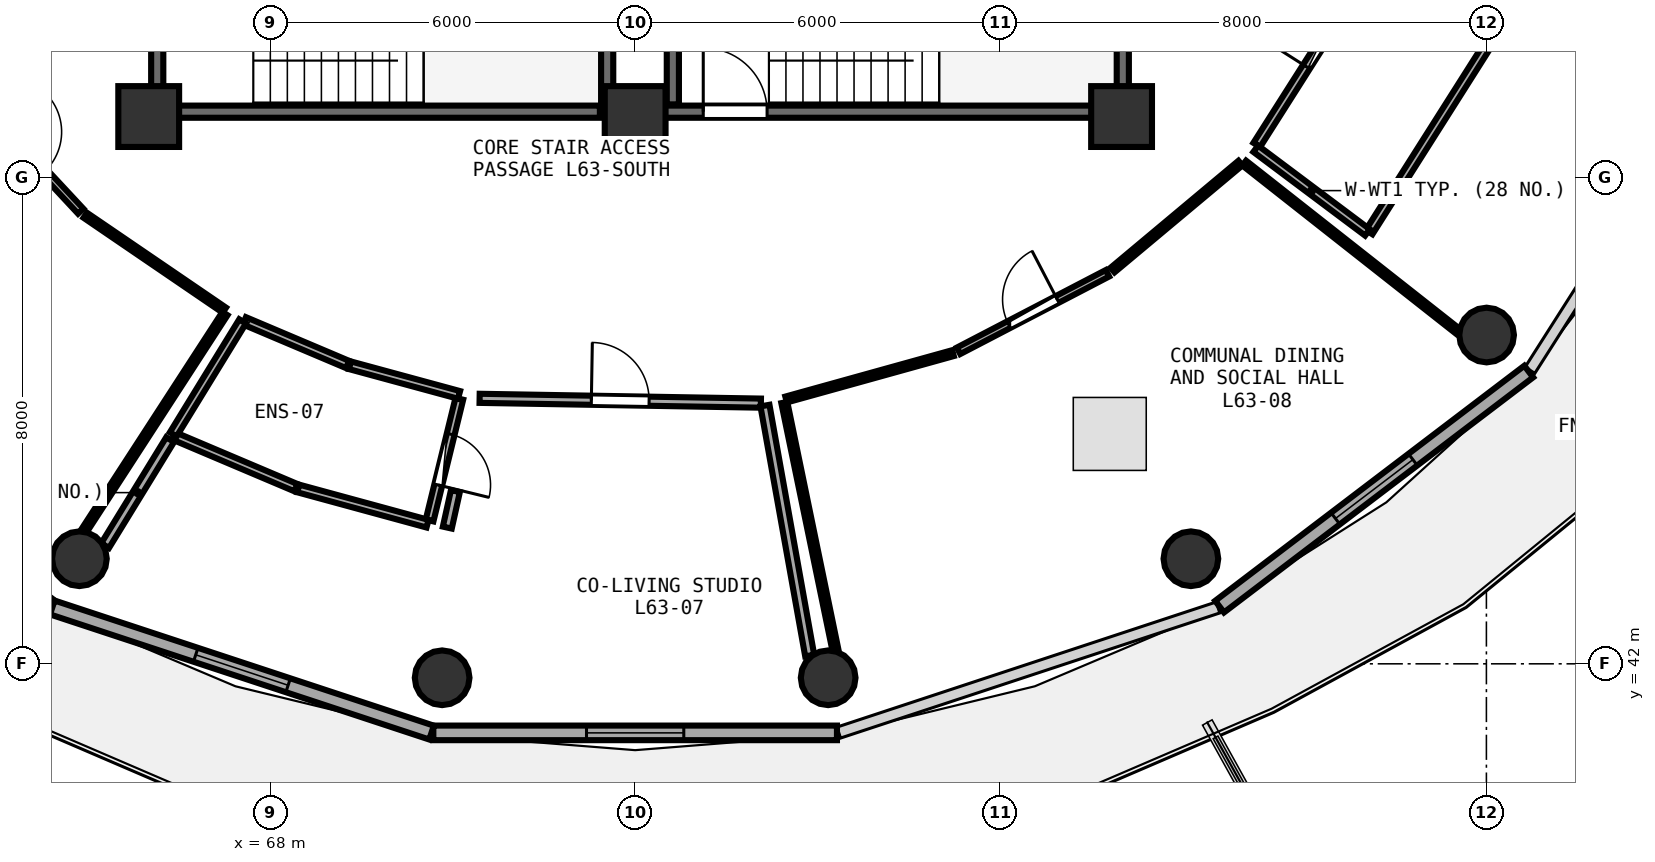
"""IFC4 building model, lengths in metres.
Left out: names, types, materials, properties, quantities, classifications, styles, units other than length and angle.
Written with IfcOpenShell. Run it as: python <this file> out.ifc"""

import sys

from ifc_helpers import new_model, si_unit, direction, frame, frame_2d, origin, origin_2d, place, context, subcontext, project, spatial, rectangle, circle, extrude, element, fill, save


model = new_model("IFC4")
c1 = context("Model", 3, precision=1e-05, world=origin(), true_north=direction((0.0, 1.0)))
c2 = subcontext(c1, "Body", "Model", "MODEL_VIEW")
j1 = project(units=[si_unit("LENGTHUNIT", "METRE"), si_unit("PLANEANGLEUNIT", "RADIAN")], contexts=[c1])
p1 = place(None, origin())
s1 = spatial("IfcSite", under=j1, at=p1, CompositionType="ELEMENT")
p2 = place(p1, origin())
s2 = spatial("IfcBuilding", under=s1, at=p2, CompositionType="ELEMENT")
p3 = place(p2, frame((0.0, 0.0, 248.7)))
s3 = spatial("IfcBuildingStorey", under=s2, at=p3, CompositionType="ELEMENT", Elevation=248.7)
for number, where, z_axis, x_axis in (
    (1, (66.0, 51.0, 0.0), (0.0, 0.0, 1.0), (1.0, 0.0, 0.0)),
    (2, (74.0, 51.0, 0.0), (0.0, 0.0, 1.0), (1.0, 0.0, 0.0)),
    (3, (82.0, 51.0, 0.0), (0.0, 0.0, 1.0), (1.0, 0.0, 0.0)),
):
    element("IfcColumn", number, at=place(p3, frame(where, z_axis=z_axis, x_axis=x_axis)), inside=s3, PredefinedType="PILASTER", context=c2, shape_type="SweptSolid", body=[
        extrude(rectangle(XDim=1.0, YDim=1.0, at=origin_2d()), origin(), (0.0, 0.0, 1.0), 3.75),
    ])
for number, where, z_axis, x_axis in (
    (4, (64.86, 43.728, 0.0), (0.0, 0.0, 1.0), (1.0, 0.0, 0.0)),
    (5, (70.826, 41.771, 0.0), (0.0, 0.0, 1.0), (1.0, 0.0, 0.0)),
    (6, (77.174, 41.771, 0.0), (0.0, 0.0, 1.0), (1.0, 0.0, 0.0)),
    (7, (83.14, 43.728, 0.0), (0.0, 0.0, 1.0), (1.0, 0.0, 0.0)),
    (8, (88.003, 47.407, 0.0), (0.0, 0.0, 1.0), (1.0, 0.0, 0.0)),
):
    element("IfcColumn", number, at=place(p3, frame(where, z_axis=z_axis, x_axis=x_axis)), inside=s3, PredefinedType="COLUMN", context=c2, shape_type="SweptSolid", body=[
        extrude(circle(Radius=0.45, at=origin_2d()), origin(), (0.0, 0.0, 1.0), 3.75),
    ])
p4 = place(p3, frame((59.304, 46.806, 0.0), z_axis=(0.0, 0.0, 1.0), x_axis=(0.796010444211, -0.605282886514, 0.0)))
e9 = element("IfcWall", 9, at=p4, inside=s3, PredefinedType="SOLIDWALL", context=c2, shape_type="SweptSolid", body=[
    extrude(rectangle(XDim=6.387, YDim=0.24, at=frame_2d((3.194, 0.0))), origin(), (0.0, 0.0, 1.0), 3.475),
])
p5 = place(p4, frame((2.394, 0.0, 0.85)))
e10 = element("IfcOpeningElement", 10, at=p5, cuts=e9, PredefinedType="OPENING", context=c2, shape_type="SweptSolid", body=[
    extrude(rectangle(XDim=1.6, YDim=1.45, at=frame_2d((0.8, 0.725))), frame((0.0, 0.13, 0.0), z_axis=(0.0, -1.0, 0.0), x_axis=(1.0, 0.0, 0.0)), (0.0, 0.0, 1.0), 0.26),
])
p6 = place(p3, frame((64.414, 42.927, 0.0), z_axis=(0.0, 0.0, 1.0), x_axis=(0.949663708393, -0.313271193954, 0.0)))
e11 = element("IfcWall", 11, at=p6, inside=s3, PredefinedType="SOLIDWALL", context=c2, shape_type="SweptSolid", body=[
    extrude(rectangle(XDim=6.568, YDim=0.24, at=frame_2d((3.284, 0.0))), origin(), (0.0, 0.0, 1.0), 3.475),
])
p7 = place(p6, frame((2.484, 0.0, 0.85)))
e12 = element("IfcOpeningElement", 12, at=p7, cuts=e11, PredefinedType="OPENING", context=c2, shape_type="SweptSolid", body=[
    extrude(rectangle(XDim=1.6, YDim=1.45, at=frame_2d((0.8, 0.725))), frame((0.0, 0.13, 0.0), z_axis=(0.0, -1.0, 0.0), x_axis=(1.0, 0.0, 0.0)), (0.0, 0.0, 1.0), 0.26),
])
p8 = place(p3, frame((70.681, 40.864, 0.0), z_axis=(0.0, 0.0, 1.0), x_axis=(1.0, 0.0, 0.0)))
e13 = element("IfcWall", 13, at=p8, inside=s3, PredefinedType="SOLIDWALL", context=c2, shape_type="SweptSolid", body=[
    extrude(rectangle(XDim=6.638, YDim=0.24, at=frame_2d((3.319, 0.0))), origin(), (0.0, 0.0, 1.0), 3.475),
])
p9 = place(p8, frame((2.519, 0.0, 0.85)))
e14 = element("IfcOpeningElement", 14, at=p9, cuts=e13, PredefinedType="OPENING", context=c2, shape_type="SweptSolid", body=[
    extrude(rectangle(XDim=1.6, YDim=1.45, at=frame_2d((0.8, 0.725))), frame((0.0, 0.13, 0.0), z_axis=(0.0, -1.0, 0.0), x_axis=(1.0, 0.0, 0.0)), (0.0, 0.0, 1.0), 0.26),
])
p10 = place(p3, frame((83.612, 42.94, 0.0), z_axis=(0.0, 0.0, 1.0), x_axis=(0.796010444211, 0.605282886514, 0.0)))
e15 = element("IfcWall", 15, at=p10, inside=s3, PredefinedType="SOLIDWALL", context=c2, shape_type="SweptSolid", body=[
    extrude(rectangle(XDim=6.387, YDim=0.24, at=frame_2d((3.194, 0.0))), origin(), (0.0, 0.0, 1.0), 3.475),
])
p11 = place(p10, frame((2.394, 0.0, 0.85)))
e16 = element("IfcOpeningElement", 16, at=p11, cuts=e15, PredefinedType="OPENING", context=c2, shape_type="SweptSolid", body=[
    extrude(rectangle(XDim=1.6, YDim=1.45, at=frame_2d((0.8, 0.725))), frame((0.0, 0.13, 0.0), z_axis=(0.0, -1.0, 0.0), x_axis=(1.0, 0.0, 0.0)), (0.0, 0.0, 1.0), 0.26),
])
p12 = place(p3, frame((74.0, 51.08, 0.0), z_axis=(0.0, 0.0, 1.0), x_axis=(1.0, 0.0, 0.0)))
e17 = element("IfcWall", 17, at=p12, inside=s3, PredefinedType="SHEAR", context=c2, shape_type="SweptSolid", body=[
    extrude(rectangle(XDim=7.9, YDim=0.2, at=frame_2d((3.95, 0.0))), origin(), (0.0, 0.0, 1.0), 3.49),
])
p13 = place(p12, frame((1.12, 0.0, 0.0)))
e18 = element("IfcOpeningElement", 18, at=p13, cuts=e17, PredefinedType="OPENING", context=c2, shape_type="SweptSolid", body=[
    extrude(rectangle(XDim=1.05, YDim=2.1, at=frame_2d((0.525, 1.05))), frame((0.0, 0.11, 0.0), z_axis=(0.0, -1.0, 0.0), x_axis=(1.0, 0.0, 0.0)), (0.0, 0.0, 1.0), 0.22),
])
for number, where, z_axis, x_axis in (
    (19, (82.02, 51.2, 0.0), (0.0, 0.0, 1.0), (0.0, 1.0, 0.0)),
    (20, (74.62, 54.27, 0.0), (0.0, 0.0, 1.0), (0.0, -1.0, 0.0)),
):
    element("IfcWall", number, at=place(p3, frame(where, z_axis=z_axis, x_axis=x_axis)), inside=s3, PredefinedType="SHEAR", context=c2, shape_type="SweptSolid", body=[
        extrude(rectangle(XDim=3.07, YDim=0.2, at=frame_2d((1.535, 0.0))), origin(), (0.0, 0.0, 1.0), 3.49),
    ])
p14 = place(p3, frame((66.26, 51.08, 0.0), z_axis=(0.0, 0.0, 1.0), x_axis=(1.0, 0.0, 0.0)))
e21 = element("IfcWall", 21, at=p14, inside=s3, PredefinedType="SHEAR", context=c2, shape_type="SweptSolid", body=[
    extrude(rectangle(XDim=7.16, YDim=0.2, at=frame_2d((3.58, 0.0))), origin(), (0.0, 0.0, 1.0), 3.49),
])
p15 = place(p3, frame((73.54, 51.2, 0.0), z_axis=(0.0, 0.0, 1.0), x_axis=(0.0, 1.0, 0.0)))
e22 = element("IfcWall", 22, at=p15, inside=s3, PredefinedType="SHEAR", context=c2, shape_type="SweptSolid", body=[
    extrude(rectangle(XDim=3.07, YDim=0.2, at=frame_2d((1.535, 0.0))), origin(), (0.0, 0.0, 1.0), 3.49),
])
p16 = place(p3, frame((66.14, 54.27, 0.0), z_axis=(0.0, 0.0, 1.0), x_axis=(0.0, -1.0, 0.0)))
e23 = element("IfcWall", 23, at=p16, inside=s3, PredefinedType="SHEAR", context=c2, shape_type="SweptSolid", body=[
    extrude(rectangle(XDim=3.07, YDim=0.2, at=frame_2d((1.535, 0.0))), origin(), (0.0, 0.0, 1.0), 3.49),
])
p17 = place(p16, frame((1.01, 0.0, 0.0)))
e24 = element("IfcOpeningElement", 24, at=p17, cuts=e23, PredefinedType="OPENING", context=c2, shape_type="SweptSolid", body=[
    extrude(rectangle(XDim=1.05, YDim=2.1, at=frame_2d((0.525, 1.05))), frame((0.0, 0.11, 0.0), z_axis=(0.0, -1.0, 0.0), x_axis=(1.0, 0.0, 0.0)), (0.0, 0.0, 1.0), 0.22),
])
p18 = place(p3, frame((63.067, 51.393, 0.0), z_axis=(0.0, 0.0, 1.0), x_axis=(0.681315269885, -0.731990097625, 0.0)))
e25 = element("IfcWall", 25, at=p18, inside=s3, PredefinedType="PARTITIONING", context=c2, shape_type="SweptSolid", body=[
    extrude(rectangle(XDim=2.664, YDim=0.12, at=frame_2d((1.332, 0.0))), origin(), (0.0, 0.0, 1.0), 3.075),
])
p19 = place(p18, frame((0.882, 0.0, 0.0)))
e26 = element("IfcOpeningElement", 26, at=p19, cuts=e25, PredefinedType="OPENING", context=c2, shape_type="SweptSolid", body=[
    extrude(rectangle(XDim=0.9, YDim=2.08, at=frame_2d((0.45, 1.04))), frame((0.0, 0.07, 0.0), z_axis=(0.0, -1.0, 0.0), x_axis=(1.0, 0.0, 0.0)), (0.0, 0.0, 1.0), 0.14),
])
p20 = place(p3, frame((71.109, 46.359, 0.0), z_axis=(0.0, 0.0, 1.0), x_axis=(-0.237485395018, -0.971391109262, 0.0)))
e27 = element("IfcWall", 27, at=p20, inside=s3, PredefinedType="PLUMBINGWALL", context=c2, shape_type="SweptSolid", body=[
    extrude(rectangle(XDim=2.06, YDim=0.13, at=frame_2d((1.03, 0.0))), origin(), (0.0, 0.0, 1.0), 3.175),
])
p21 = place(p20, frame((0.6, 0.0, 0.0)))
e28 = element("IfcOpeningElement", 28, at=p21, cuts=e27, PredefinedType="OPENING", context=c2, shape_type="SweptSolid", body=[
    extrude(rectangle(XDim=0.86, YDim=2.05, at=frame_2d((0.43, 1.025))), frame((0.0, 0.075, 0.0), z_axis=(0.0, -1.0, 0.0), x_axis=(1.0, 0.0, 0.0)), (0.0, 0.0, 1.0), 0.15),
])
p22 = place(p3, frame((71.442, 46.366, 0.0), z_axis=(0.0, 0.0, 1.0), x_axis=(0.99985475278, -0.017043278545, 0.0)))
e29 = element("IfcWall", 29, at=p22, inside=s3, PredefinedType="PARTITIONING", context=c2, shape_type="SweptSolid", body=[
    extrude(rectangle(XDim=4.627, YDim=0.15, at=frame_2d((2.313, 0.0))), origin(), (0.0, 0.0, 1.0), 3.075),
])
p23 = place(p22, frame((1.838, 0.0, 0.0)))
e30 = element("IfcOpeningElement", 30, at=p23, cuts=e29, PredefinedType="OPENING", context=c2, shape_type="SweptSolid", body=[
    extrude(rectangle(XDim=0.95, YDim=2.08, at=frame_2d((0.475, 1.04))), frame((0.0, 0.085, 0.0), z_axis=(0.0, -1.0, 0.0), x_axis=(1.0, 0.0, 0.0)), (0.0, 0.0, 1.0), 0.17),
])
p24 = place(p3, frame((79.319, 47.148, 0.0), z_axis=(0.0, 0.0, 1.0), x_axis=(0.887021247279, 0.461728607382, 0.0)))
e31 = element("IfcWall", 31, at=p24, inside=s3, PredefinedType="PARTITIONING", context=c2, shape_type="SweptSolid", body=[
    extrude(rectangle(XDim=2.761, YDim=0.12, at=frame_2d((1.38, 0.0))), origin(), (0.0, 0.0, 1.0), 3.235),
])
p25 = place(p24, frame((0.93, 0.0, 0.0)))
e32 = element("IfcOpeningElement", 32, at=p25, cuts=e31, PredefinedType="OPENING", context=c2, shape_type="SweptSolid", body=[
    extrude(rectangle(XDim=0.9, YDim=2.08, at=frame_2d((0.45, 1.04))), frame((0.0, 0.07, 0.0), z_axis=(0.0, -1.0, 0.0), x_axis=(1.0, 0.0, 0.0)), (0.0, 0.0, 1.0), 0.14),
])
p26 = place(p3, frame((84.223, 50.533, 0.0), z_axis=(0.0, 0.0, 1.0), x_axis=(0.536434868975, 0.84394172272, 0.0)))
e33 = element("IfcWall", 33, at=p26, inside=s3, PredefinedType="PLUMBINGWALL", context=c2, shape_type="SweptSolid", body=[
    extrude(rectangle(XDim=3.908, YDim=0.13, at=frame_2d((1.954, 0.0))), origin(), (0.0, 0.0, 1.0), 3.075),
])
p27 = place(p26, frame((1.524, 0.0, 0.0)))
e34 = element("IfcOpeningElement", 34, at=p27, cuts=e33, PredefinedType="OPENING", context=c2, shape_type="SweptSolid", body=[
    extrude(rectangle(XDim=0.86, YDim=2.05, at=frame_2d((0.43, 1.025))), frame((0.0, 0.075, 0.0), z_axis=(0.0, -1.0, 0.0), x_axis=(1.0, 0.0, 0.0)), (0.0, 0.0, 1.0), 0.15),
])
p28 = place(p3, frame((64.956, 49.376, 0.0), z_axis=(0.0, 0.0, 1.0), x_axis=(0.826087380575, -0.563542047814, 0.0)))
e35 = element("IfcWall", 35, at=p28, inside=s3, PredefinedType="PARTITIONING", context=c2, shape_type="SweptSolid", body=[
    extrude(rectangle(XDim=2.768, YDim=0.1, at=frame_2d((1.384, 0.0))), origin(), (0.0, 0.0, 1.0), 3.075),
])
p29 = place(p3, frame((67.254, 47.76, 0.0), z_axis=(0.0, 0.0, 1.0), x_axis=(-0.544234825024, -0.838932926539, 0.0)))
e36 = element("IfcWall", 36, at=p29, inside=s3, PredefinedType="PARTITIONING", context=c2, shape_type="SweptSolid", body=[
    extrude(rectangle(XDim=4.249, YDim=0.1, at=frame_2d((2.125, 0.0))), origin(), (0.0, 0.0, 1.0), 3.075),
])
p30 = place(p3, frame((67.573, 47.641, 0.0), z_axis=(0.0, 0.0, 1.0), x_axis=(0.920910556575, -0.389773968845, 0.0)))
e37 = element("IfcWall", 37, at=p30, inside=s3, PredefinedType="PLUMBINGWALL", context=c2, shape_type="SweptSolid", body=[
    extrude(rectangle(XDim=1.843, YDim=0.13, at=frame_2d((0.921, 0.0))), origin(), (0.0, 0.0, 1.0), 3.48),
])
p31 = place(p3, frame((69.308, 46.91, 0.0), z_axis=(0.0, 0.0, 1.0), x_axis=(0.96501774213, -0.262184586453, 0.0)))
e38 = element("IfcWall", 38, at=p31, inside=s3, PredefinedType="PLUMBINGWALL", context=c2, shape_type="SweptSolid", body=[
    extrude(rectangle(XDim=1.861, YDim=0.13, at=frame_2d((0.93, 0.0))), origin(), (0.0, 0.0, 1.0), 3.48),
])
p32 = place(p3, frame((70.586, 44.304, 0.0), z_axis=(0.0, 0.0, 1.0), x_axis=(-0.96480470919, 0.262967437384, 0.0)))
e39 = element("IfcWall", 39, at=p32, inside=s3, PredefinedType="PLUMBINGWALL", context=c2, shape_type="SweptSolid", body=[
    extrude(rectangle(XDim=2.204, YDim=0.13, at=frame_2d((1.102, 0.0))), origin(), (0.0, 0.0, 1.0), 3.48),
])
p33 = place(p3, frame((68.422, 44.897, 0.0), z_axis=(0.0, 0.0, 1.0), x_axis=(-0.920791207069, 0.390055833162, 0.0)))
e40 = element("IfcWall", 40, at=p33, inside=s3, PredefinedType="PLUMBINGWALL", context=c2, shape_type="SweptSolid", body=[
    extrude(rectangle(XDim=2.183, YDim=0.13, at=frame_2d((1.092, 0.0))), origin(), (0.0, 0.0, 1.0), 3.48),
])
p34 = place(p3, frame((66.404, 45.773, 0.0), z_axis=(0.0, 0.0, 1.0), x_axis=(0.523029155304, 0.85231479085, 0.0)))
e41 = element("IfcWall", 41, at=p34, inside=s3, PredefinedType="PLUMBINGWALL", context=c2, shape_type="SweptSolid", body=[
    extrude(rectangle(XDim=2.181, YDim=0.13, at=frame_2d((1.091, 0.0))), origin(), (0.0, 0.0, 1.0), 3.175),
])
p35 = place(p3, frame((76.135, 46.247, 0.0), z_axis=(0.0, 0.0, 1.0), x_axis=(0.176199339585, -0.984354505618, 0.0)))
e42 = element("IfcWall", 42, at=p35, inside=s3, PredefinedType="PARTITIONING", context=c2, shape_type="SweptSolid", body=[
    extrude(rectangle(XDim=4.176, YDim=0.15, at=frame_2d((2.088, 0.0))), origin(), (0.0, 0.0, 1.0), 3.075),
])
p36 = place(p3, frame((65.283, 43.944, 0.0), z_axis=(0.0, 0.0, 1.0), x_axis=(0.522864415557, 0.852415862677, 0.0)))
e43 = element("IfcWall", 43, at=p36, inside=s3, PredefinedType="PARTITIONING", context=c2, shape_type="SweptSolid", body=[
    extrude(rectangle(XDim=2.045, YDim=0.15, at=frame_2d((1.022, 0.0))), origin(), (0.0, 0.0, 1.0), 3.235),
])
p37 = place(p3, frame((70.911, 44.24, 0.0), z_axis=(0.0, 0.0, 1.0), x_axis=(0.216216290924, 0.976345489844, 0.0)))
e44 = element("IfcWall", 44, at=p37, inside=s3, PredefinedType="PARTITIONING", context=c2, shape_type="SweptSolid", body=[
    extrude(rectangle(XDim=0.615, YDim=0.15, at=frame_2d((0.308, 0.0))), origin(), (0.0, 0.0, 1.0), 3.48),
])
p38 = place(p3, frame((76.483, 46.347, 0.0), z_axis=(0.0, 0.0, 1.0), x_axis=(0.963478601256, 0.267785333659, 0.0)))
e45 = element("IfcWall", 45, at=p38, inside=s3, PredefinedType="PARTITIONING", context=c2, shape_type="SweptSolid", body=[
    extrude(rectangle(XDim=2.848, YDim=0.1, at=frame_2d((1.424, 0.0))), origin(), (0.0, 0.0, 1.0), 3.48),
])
p39 = place(p3, frame((81.852, 48.476, 0.0), z_axis=(0.0, 0.0, 1.0), x_axis=(0.767022676895, 0.641619991216, 0.0)))
e46 = element("IfcWall", 46, at=p39, inside=s3, PredefinedType="PARTITIONING", context=c2, shape_type="SweptSolid", body=[
    extrude(rectangle(XDim=2.741, YDim=0.1, at=frame_2d((1.371, 0.0))), origin(), (0.0, 0.0, 1.0), 3.075),
])
p40 = place(p3, frame((84.016, 50.235, 0.0), z_axis=(0.0, 0.0, 1.0), x_axis=(0.785736749878, -0.618561039745, 0.0)))
e47 = element("IfcWall", 47, at=p40, inside=s3, PredefinedType="PARTITIONING", context=c2, shape_type="SweptSolid", body=[
    extrude(rectangle(XDim=4.475, YDim=0.1, at=frame_2d((2.237, 0.0))), origin(), (0.0, 0.0, 1.0), 3.075),
])
p41 = place(p3, frame((77.293, 42.23, 0.0), z_axis=(0.0, 0.0, 1.0), x_axis=(-0.202308141573, 0.979321916355, 0.0)))
e48 = element("IfcWall", 48, at=p41, inside=s3, PredefinedType="PARTITIONING", context=c2, shape_type="SweptSolid", body=[
    extrude(rectangle(XDim=4.153, YDim=0.1, at=frame_2d((2.076, 0.0))), origin(), (0.0, 0.0, 1.0), 3.175),
])
p42 = place(p3, frame((88.606, 53.098, 0.0), z_axis=(0.0, 0.0, 1.0), x_axis=(-0.535433501212, -0.844577388864, 0.0)))
e49 = element("IfcWall", 49, at=p42, inside=s3, PredefinedType="PLUMBINGWALL", context=c2, shape_type="SweptSolid", body=[
    extrude(rectangle(XDim=4.735, YDim=0.13, at=frame_2d((2.368, 0.0))), origin(), (0.0, 0.0, 1.0), 3.075),
])
p43 = place(p3, frame((86.044, 49.094, 0.0), z_axis=(0.0, 0.0, 1.0), x_axis=(-0.800357274386, 0.599523338442, 0.0)))
e50 = element("IfcWall", 50, at=p43, inside=s3, PredefinedType="PLUMBINGWALL", context=c2, shape_type="SweptSolid", body=[
    extrude(rectangle(XDim=2.295, YDim=0.13, at=frame_2d((1.147, 0.0))), origin(), (0.0, 0.0, 1.0), 3.175),
])
p44 = place(p7, origin())
e51 = element("IfcWindow", 51, at=p44, inside=s3, PartitioningType="SINGLE_PANEL", PredefinedType="WINDOW", context=c2, shape_type="SweptSolid", body=[
    extrude(rectangle(XDim=1.6, YDim=1.45, at=frame_2d((0.8, 0.725))), frame((0.0, 0.03, 0.0), z_axis=(0.0, -1.0, 0.0), x_axis=(1.0, 0.0, 0.0)), (0.0, 0.0, 1.0), 0.06),
])
fill(e12, e51)
p45 = place(p9, origin())
e52 = element("IfcWindow", 52, at=p45, inside=s3, PartitioningType="SINGLE_PANEL", PredefinedType="WINDOW", context=c2, shape_type="SweptSolid", body=[
    extrude(rectangle(XDim=1.6, YDim=1.45, at=frame_2d((0.8, 0.725))), frame((0.0, 0.03, 0.0), z_axis=(0.0, -1.0, 0.0), x_axis=(1.0, 0.0, 0.0)), (0.0, 0.0, 1.0), 0.06),
])
fill(e14, e52)
p46 = place(p11, origin())
e53 = element("IfcWindow", 53, at=p46, inside=s3, PartitioningType="SINGLE_PANEL", PredefinedType="WINDOW", context=c2, shape_type="SweptSolid", body=[
    extrude(rectangle(XDim=1.6, YDim=1.45, at=frame_2d((0.8, 0.725))), frame((0.0, 0.03, 0.0), z_axis=(0.0, -1.0, 0.0), x_axis=(1.0, 0.0, 0.0)), (0.0, 0.0, 1.0), 0.06),
])
fill(e16, e53)
p47 = place(p13, origin())
e54 = element("IfcDoor", 54, at=p47, inside=s3, OperationType="SINGLE_SWING_LEFT", PredefinedType="DOOR", context=c2, shape_type="SweptSolid", body=[
    extrude(rectangle(XDim=1.05, YDim=2.1, at=frame_2d((0.525, 1.05))), frame((0.0, 0.025, 0.0), z_axis=(0.0, -1.0, 0.0), x_axis=(1.0, 0.0, 0.0)), (0.0, 0.0, 1.0), 0.05),
])
fill(e18, e54)
p48 = place(p21, origin())
e55 = element("IfcDoor", 55, at=p48, inside=s3, OperationType="SINGLE_SWING_RIGHT", PredefinedType="DOOR", context=c2, shape_type="SweptSolid", body=[
    extrude(rectangle(XDim=0.86, YDim=2.05, at=frame_2d((0.43, 1.025))), frame((0.0, 0.025, 0.0), z_axis=(0.0, -1.0, 0.0), x_axis=(1.0, 0.0, 0.0)), (0.0, 0.0, 1.0), 0.05),
])
fill(e28, e55)
p49 = place(p23, origin())
e56 = element("IfcDoor", 56, at=p49, inside=s3, OperationType="SINGLE_SWING_LEFT", PredefinedType="DOOR", context=c2, shape_type="SweptSolid", body=[
    extrude(rectangle(XDim=0.95, YDim=2.08, at=frame_2d((0.475, 1.04))), frame((0.0, 0.025, 0.0), z_axis=(0.0, -1.0, 0.0), x_axis=(1.0, 0.0, 0.0)), (0.0, 0.0, 1.0), 0.05),
])
fill(e30, e56)
p50 = place(p25, origin())
e57 = element("IfcDoor", 57, at=p50, inside=s3, OperationType="SINGLE_SWING_RIGHT", PredefinedType="DOOR", context=c2, shape_type="SweptSolid", body=[
    extrude(rectangle(XDim=0.9, YDim=2.08, at=frame_2d((0.45, 1.04))), frame((0.0, 0.025, 0.0), z_axis=(0.0, -1.0, 0.0), x_axis=(1.0, 0.0, 0.0)), (0.0, 0.0, 1.0), 0.05),
])
fill(e32, e57)
p51 = place(p27, origin())
e58 = element("IfcDoor", 58, at=p51, inside=s3, OperationType="SINGLE_SWING_LEFT", PredefinedType="DOOR", context=c2, shape_type="SweptSolid", body=[
    extrude(rectangle(XDim=0.86, YDim=2.05, at=frame_2d((0.43, 1.025))), frame((0.0, 0.025, 0.0), z_axis=(0.0, -1.0, 0.0), x_axis=(1.0, 0.0, 0.0)), (0.0, 0.0, 1.0), 0.05),
])
fill(e34, e58)
save(model, sys.argv[1])
